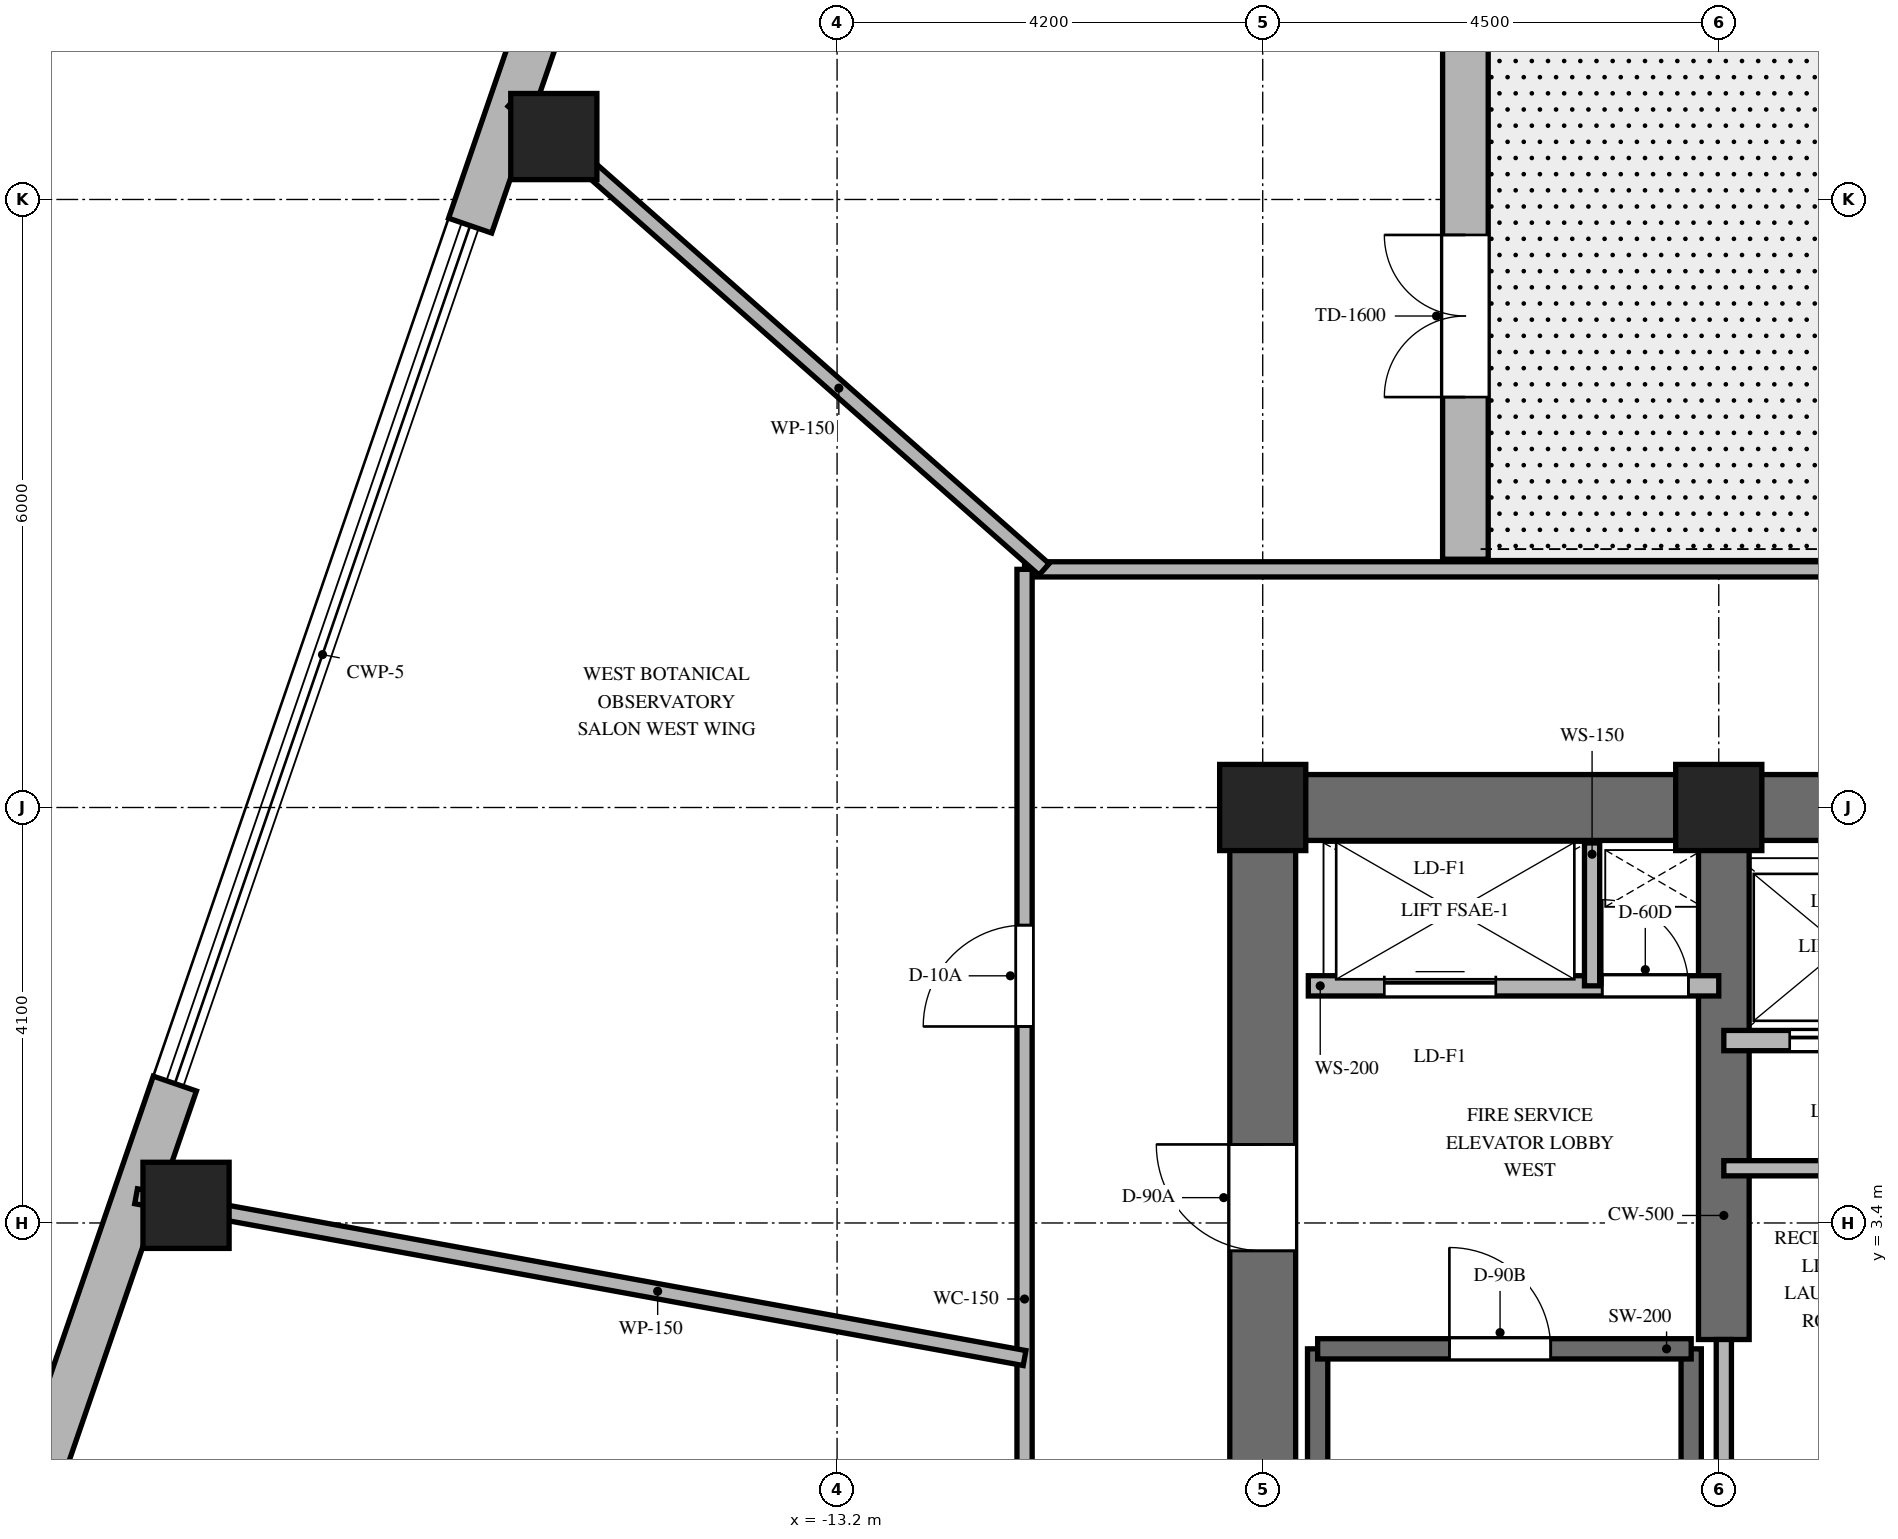
"""IFC4 building model, lengths in metres.
Left out: names, types, materials, properties, quantities, classifications, styles, units other than length and angle.
Written with IfcOpenShell. Run it as: python <this file> out.ifc"""

import sys

from ifc_helpers import new_model, si_unit, direction, frame, frame_2d, origin, origin_2d, place, context, subcontext, project, spatial, rectangle, extrude, element, fill, save


model = new_model("IFC4")
c1 = context("Model", 3, precision=1e-05, world=origin(), true_north=direction((0.0, 1.0)))
c2 = subcontext(c1, "Body", "Model", "MODEL_VIEW")
j1 = project(units=[si_unit("LENGTHUNIT", "METRE"), si_unit("PLANEANGLEUNIT", "RADIAN")], contexts=[c1])
p1 = place(None, origin())
s1 = spatial("IfcSite", under=j1, at=p1, CompositionType="ELEMENT")
p2 = place(p1, origin())
s2 = spatial("IfcBuilding", under=s1, at=p2, CompositionType="ELEMENT")
p3 = place(p2, frame((0.0, 0.0, 288.6)))
s3 = spatial("IfcBuildingStorey", under=s2, at=p3, CompositionType="ELEMENT", Elevation=288.6)
p4 = place(p3, frame((-9.325, 7.5, 0.0), z_axis=(0.0, 0.0, 1.0), x_axis=(1.0, 0.0, 0.0)))
e1 = element("IfcWall", 1, at=p4, inside=s3, PredefinedType="SHEAR", context=c2, shape_type="SweptSolid", body=[
    extrude(rectangle(XDim=9.375, YDim=0.65, at=frame_2d((4.688, 0.0))), origin(), (0.0, 0.0, 1.0), 4.5),
])
p5 = place(p3, frame((-9.0, -7.175, 0.0), z_axis=(0.0, 0.0, 1.0), x_axis=(0.0, 1.0, 0.0)))
e2 = element("IfcWall", 2, at=p5, inside=s3, PredefinedType="SHEAR", context=c2, shape_type="SweptSolid", body=[
    extrude(rectangle(XDim=14.35, YDim=0.65, at=frame_2d((7.175, 0.0))), origin(), (0.0, 0.0, 1.0), 4.5),
])
p6 = place(p5, frame((10.3, 0.0, 0.0)))
e3 = element("IfcOpeningElement", 3, at=p6, cuts=e2, PredefinedType="OPENING", context=c2, shape_type="SweptSolid", body=[
    extrude(rectangle(XDim=1.05, YDim=2.15, at=frame_2d((0.525, 1.075))), frame((0.0, 0.335, 0.0), z_axis=(0.0, -1.0, 0.0), x_axis=(1.0, 0.0, 0.0)), (0.0, 0.0, 1.0), 0.67),
])
p7 = place(p3, frame((-4.45, 2.25, 0.0), z_axis=(0.0, 0.0, 1.0), x_axis=(0.0, 1.0, 0.0)))
e4 = element("IfcWall", 4, at=p7, inside=s3, PredefinedType="SHEAR", context=c2, shape_type="SweptSolid", body=[
    extrude(rectangle(XDim=4.925, YDim=0.5, at=frame_2d((2.462, 0.0))), origin(), (0.0, 0.0, 1.0), 4.5),
])
for number, where, z_axis, x_axis in (
    (5, (-8.458, -6.985, 0.0), (0.0, 0.0, 1.0), (0.0, 1.0, 0.0)),
    (6, (-4.772, -6.985, 0.0), (0.0, 0.0, 1.0), (0.0, 1.0, 0.0)),
):
    element("IfcWall", number, at=place(p3, frame(where, z_axis=z_axis, x_axis=x_axis)), inside=s3, PredefinedType="SHEAR", context=c2, shape_type="SweptSolid", body=[
        extrude(rectangle(XDim=9.143, YDim=0.2, at=frame_2d((4.572, 0.0))), origin(), (0.0, 0.0, 1.0), 4.5),
    ])
p8 = place(p3, frame((-8.458, 2.158, 0.0), z_axis=(0.0, 0.0, 1.0), x_axis=(1.0, 0.0, 0.0)))
e7 = element("IfcWall", 7, at=p8, inside=s3, PredefinedType="SHEAR", context=c2, shape_type="SweptSolid", body=[
    extrude(rectangle(XDim=3.686, YDim=0.2, at=frame_2d((1.843, 0.0))), origin(), (0.0, 0.0, 1.0), 4.5),
])
p9 = place(p8, frame((1.3, 0.0, 0.0)))
e8 = element("IfcOpeningElement", 8, at=p9, cuts=e7, PredefinedType="OPENING", context=c2, shape_type="SweptSolid", body=[
    extrude(rectangle(XDim=1.0, YDim=2.15, at=frame_2d((0.5, 1.075))), frame((0.0, 0.11, 0.0), z_axis=(0.0, -1.0, 0.0), x_axis=(1.0, 0.0, 0.0)), (0.0, 0.0, 1.0), 0.22),
])
for number, where, z_axis, x_axis in (
    (9, (-4.5, 7.5, 0.0), (0.0, 0.0, 1.0), (1.0, 0.0, 0.0)),
    (10, (-9.0, 7.5, 0.0), (0.0, 0.0, 1.0), (1.0, 0.0, 0.0)),
    (11, (-15.995, 14.121, 0.0), (0.0, 0.0, 1.0), (1.0, 0.0, 0.0)),
    (12, (-19.624, 3.574, 0.0), (0.0, 0.0, 1.0), (1.0, 0.0, 0.0)),
):
    element("IfcColumn", number, at=place(p3, frame(where, z_axis=z_axis, x_axis=x_axis)), inside=s3, PredefinedType="COLUMN", context=c2, shape_type="SweptSolid", body=[
        extrude(rectangle(XDim=0.85, YDim=0.85, at=origin_2d()), origin(), (0.0, 0.0, 1.0), 4.5),
    ])
p10 = place(p3, frame((-7.0, 9.95, 0.0), z_axis=(0.0, 0.0, 1.0), x_axis=(0.0, 1.0, 0.0)))
e13 = element("IfcWall", 13, at=p10, inside=s3, PredefinedType="SOLIDWALL", context=c2, shape_type="SweptSolid", body=[
    extrude(rectangle(XDim=10.125, YDim=0.45, at=frame_2d((5.062, 0.0))), origin(), (0.0, 0.0, 1.0), 4.18),
])
p11 = place(p10, frame((1.6, 0.0, 0.0)))
e14 = element("IfcOpeningElement", 14, at=p11, cuts=e13, PredefinedType="OPENING", context=c2, shape_type="SweptSolid", body=[
    extrude(rectangle(XDim=1.6, YDim=2.25, at=frame_2d((0.8, 1.125))), frame((0.0, 0.235, 0.0), z_axis=(0.0, -1.0, 0.0), x_axis=(1.0, 0.0, 0.0)), (0.0, 0.0, 1.0), 0.47),
])
p12 = place(p3, frame((-15.26, 17.776, 0.0), z_axis=(0.0, 0.0, 1.0), x_axis=(-0.325408461582, -0.945573547182, 0.0)))
e15 = element("IfcWall", 15, at=p12, inside=s3, PredefinedType="SOLIDWALL", context=c2, shape_type="SweptSolid", body=[
    extrude(rectangle(XDim=4.795, YDim=0.45, at=frame_2d((2.397, 0.0))), origin(), (0.0, 0.0, 1.0), 4.18),
])
p13 = place(p3, frame((-19.734, 4.775, 0.0), z_axis=(0.0, 0.0, 1.0), x_axis=(-0.325437701015, -0.945563484256, 0.0)))
e16 = element("IfcWall", 16, at=p13, inside=s3, PredefinedType="SOLIDWALL", context=c2, shape_type="SweptSolid", body=[
    extrude(rectangle(XDim=4.803, YDim=0.45, at=frame_2d((2.402, 0.0))), origin(), (0.0, 0.0, 1.0), 4.18),
])
p14 = place(p3, frame((-8.55, 5.74, 0.0), z_axis=(0.0, 0.0, 1.0), x_axis=(1.0, 0.0, 0.0)))
e17 = element("IfcWall", 17, at=p14, inside=s3, PredefinedType="PARTITIONING", context=c2, shape_type="SweptSolid", body=[
    extrude(rectangle(XDim=4.05, YDim=0.2, at=frame_2d((2.025, 0.0))), origin(), (0.0, 0.0, 1.0), 4.18),
])
p15 = place(p14, frame((0.75, 0.0, 0.0)))
e18 = element("IfcOpeningElement", 18, at=p15, cuts=e17, PredefinedType="OPENING", context=c2, shape_type="SweptSolid", body=[
    extrude(rectangle(XDim=1.1, YDim=2.2, at=frame_2d((0.55, 1.1))), frame((0.0, 0.11, 0.0), z_axis=(0.0, -1.0, 0.0), x_axis=(1.0, 0.0, 0.0)), (0.0, 0.0, 1.0), 0.22),
])
p16 = place(p14, frame((2.9, 0.0, 0.0)))
e19 = element("IfcOpeningElement", 19, at=p16, cuts=e17, PredefinedType="OPENING", context=c2, shape_type="SweptSolid", body=[
    extrude(rectangle(XDim=0.85, YDim=2.03, at=frame_2d((0.425, 1.015))), frame((0.0, 0.11, 0.0), z_axis=(0.0, -1.0, 0.0), x_axis=(1.0, 0.0, 0.0)), (0.0, 0.0, 1.0), 0.22),
])
p17 = place(p3, frame((-5.75, 5.74, 0.0), z_axis=(0.0, 0.0, 1.0), x_axis=(0.0, 1.0, 0.0)))
e20 = element("IfcWall", 20, at=p17, inside=s3, PredefinedType="PARTITIONING", context=c2, shape_type="SweptSolid", body=[
    extrude(rectangle(XDim=1.41, YDim=0.15, at=frame_2d((0.705, 0.0))), origin(), (0.0, 0.0, 1.0), 4.18),
])
p18 = place(p3, frame((-4.45, 5.2, 0.0), z_axis=(0.0, 0.0, 1.0), x_axis=(1.0, 0.0, 0.0)))
e21 = element("IfcWall", 21, at=p18, inside=s3, PredefinedType="PARTITIONING", context=c2, shape_type="SweptSolid", body=[
    extrude(rectangle(XDim=4.5, YDim=0.2, at=frame_2d((2.25, 0.0))), origin(), (0.0, 0.0, 1.0), 4.18),
])
p19 = place(p18, frame((0.65, 0.0, 0.0)))
e22 = element("IfcOpeningElement", 22, at=p19, cuts=e21, PredefinedType="OPENING", context=c2, shape_type="SweptSolid", body=[
    extrude(rectangle(XDim=1.0, YDim=2.2, at=frame_2d((0.5, 1.1))), frame((0.0, 0.11, 0.0), z_axis=(0.0, -1.0, 0.0), x_axis=(1.0, 0.0, 0.0)), (0.0, 0.0, 1.0), 0.22),
])
p20 = place(p18, frame((2.85, 0.0, 0.0)))
e23 = element("IfcOpeningElement", 23, at=p20, cuts=e21, PredefinedType="OPENING", context=c2, shape_type="SweptSolid", body=[
    extrude(rectangle(XDim=1.0, YDim=2.2, at=frame_2d((0.5, 1.1))), frame((0.0, 0.11, 0.0), z_axis=(0.0, -1.0, 0.0), x_axis=(1.0, 0.0, 0.0)), (0.0, 0.0, 1.0), 0.22),
])
p21 = place(p3, frame((-4.45, -0.5, 0.0), z_axis=(0.0, 0.0, 1.0), x_axis=(0.0, 1.0, 0.0)))
e24 = element("IfcWall", 24, at=p21, inside=s3, PredefinedType="PARTITIONING", context=c2, shape_type="SweptSolid", body=[
    extrude(rectangle(XDim=2.75, YDim=0.15, at=frame_2d((1.375, 0.0))), origin(), (0.0, 0.0, 1.0), 4.18),
])
p22 = place(p3, frame((-4.45, 3.94, 0.0), z_axis=(0.0, 0.0, 1.0), x_axis=(1.0, 0.0, 0.0)))
e25 = element("IfcWall", 25, at=p22, inside=s3, PredefinedType="PARTITIONING", context=c2, shape_type="SweptSolid", body=[
    extrude(rectangle(XDim=2.55, YDim=0.15, at=frame_2d((1.275, 0.0))), origin(), (0.0, 0.0, 1.0), 4.18),
])
p23 = place(p3, frame((-11.35, 9.85, 0.0), z_axis=(0.0, 0.0, 1.0), x_axis=(1.0, 0.0, 0.0)))
e26 = element("IfcWall", 26, at=p23, inside=s3, PredefinedType="PARTITIONING", context=c2, shape_type="SweptSolid", body=[
    extrude(rectangle(XDim=22.7, YDim=0.15, at=frame_2d((11.35, 0.0))), origin(), (0.0, 0.0, 1.0), 3.67),
])
p24 = place(p23, frame((18.896, 0.0, 0.0)))
e27 = element("IfcOpeningElement", 27, at=p24, cuts=e26, PredefinedType="OPENING", context=c2, shape_type="SweptSolid", body=[
    extrude(rectangle(XDim=1.0, YDim=2.03, at=frame_2d((0.5, 1.015))), frame((0.0, 0.085, 0.0), z_axis=(0.0, -1.0, 0.0), x_axis=(1.0, 0.0, 0.0)), (0.0, 0.0, 1.0), 0.17),
])
p25 = place(p3, frame((-11.35, -9.85, 0.0), z_axis=(0.0, 0.0, 1.0), x_axis=(0.0, 1.0, 0.0)))
e28 = element("IfcWall", 28, at=p25, inside=s3, PredefinedType="PARTITIONING", context=c2, shape_type="SweptSolid", body=[
    extrude(rectangle(XDim=19.7, YDim=0.15, at=frame_2d((9.85, 0.0))), origin(), (0.0, 0.0, 1.0), 3.67),
])
p26 = place(p25, frame((15.189, 0.0, 0.0)))
e29 = element("IfcOpeningElement", 29, at=p26, cuts=e28, PredefinedType="OPENING", context=c2, shape_type="SweptSolid", body=[
    extrude(rectangle(XDim=1.0, YDim=2.03, at=frame_2d((0.5, 1.015))), frame((0.0, 0.085, 0.0), z_axis=(0.0, -1.0, 0.0), x_axis=(1.0, 0.0, 0.0)), (0.0, 0.0, 1.0), 0.17),
])
p27 = place(p25, frame((8.81, 0.0, 0.0)))
e30 = element("IfcOpeningElement", 30, at=p27, cuts=e28, PredefinedType="OPENING", context=c2, shape_type="SweptSolid", body=[
    extrude(rectangle(XDim=1.0, YDim=2.03, at=frame_2d((0.5, 1.015))), frame((0.0, 0.085, 0.0), z_axis=(0.0, -1.0, 0.0), x_axis=(1.0, 0.0, 0.0)), (0.0, 0.0, 1.0), 0.17),
])
p28 = place(p25, frame((2.973, 0.0, 0.0)))
e31 = element("IfcOpeningElement", 31, at=p28, cuts=e28, PredefinedType="OPENING", context=c2, shape_type="SweptSolid", body=[
    extrude(rectangle(XDim=1.0, YDim=2.03, at=frame_2d((0.5, 1.015))), frame((0.0, 0.085, 0.0), z_axis=(0.0, -1.0, 0.0), x_axis=(1.0, 0.0, 0.0)), (0.0, 0.0, 1.0), 0.17),
])
p29 = place(p3, frame((-11.157, 9.85, 0.0), z_axis=(0.0, 0.0, 1.0), x_axis=(-0.74966962095, 0.661812253909, 0.0)))
e32 = element("IfcWall", 32, at=p29, inside=s3, PredefinedType="PARTITIONING", context=c2, shape_type="SweptSolid", body=[
    extrude(rectangle(XDim=6.989, YDim=0.15, at=frame_2d((3.494, 0.0))), origin(), (0.0, 0.0, 1.0), 3.52),
])
p30 = place(p3, frame((-11.35, 2.067, 0.0), z_axis=(0.0, 0.0, 1.0), x_axis=(-0.983816386236, 0.179179569634, 0.0)))
e33 = element("IfcWall", 33, at=p30, inside=s3, PredefinedType="PARTITIONING", context=c2, shape_type="SweptSolid", body=[
    extrude(rectangle(XDim=8.911, YDim=0.15, at=frame_2d((4.456, 0.0))), origin(), (0.0, 0.0, 1.0), 3.52),
])
p31 = place(p11, origin())
e34 = element("IfcDoor", 34, at=p31, inside=s3, OperationType="DOUBLE_SWING_LEFT", PredefinedType="DOOR", context=c2, shape_type="SweptSolid", body=[
    extrude(rectangle(XDim=1.6, YDim=2.25, at=frame_2d((0.8, 1.125))), frame((0.0, 0.025, 0.0), z_axis=(0.0, -1.0, 0.0), x_axis=(1.0, 0.0, 0.0)), (0.0, 0.0, 1.0), 0.05),
])
fill(e14, e34)
p32 = place(p9, origin())
e35 = element("IfcDoor", 35, at=p32, inside=s3, OperationType="SINGLE_SWING_LEFT", PredefinedType="DOOR", context=c2, shape_type="SweptSolid", body=[
    extrude(rectangle(XDim=1.0, YDim=2.15, at=frame_2d((0.5, 1.075))), frame((0.0, 0.025, 0.0), z_axis=(0.0, -1.0, 0.0), x_axis=(1.0, 0.0, 0.0)), (0.0, 0.0, 1.0), 0.05),
])
fill(e8, e35)
p33 = place(p6, origin())
e36 = element("IfcDoor", 36, at=p33, inside=s3, OperationType="SINGLE_SWING_RIGHT", PredefinedType="DOOR", context=c2, shape_type="SweptSolid", body=[
    extrude(rectangle(XDim=1.05, YDim=2.15, at=frame_2d((0.525, 1.075))), frame((0.0, 0.025, 0.0), z_axis=(0.0, -1.0, 0.0), x_axis=(1.0, 0.0, 0.0)), (0.0, 0.0, 1.0), 0.05),
])
fill(e3, e36)
p34 = place(p15, origin())
e37 = element("IfcDoor", 37, at=p34, inside=s3, OperationType="SLIDING_TO_LEFT", PredefinedType="DOOR", context=c2, shape_type="SweptSolid", body=[
    extrude(rectangle(XDim=1.1, YDim=2.2, at=frame_2d((0.55, 1.1))), frame((0.0, 0.025, 0.0), z_axis=(0.0, -1.0, 0.0), x_axis=(1.0, 0.0, 0.0)), (0.0, 0.0, 1.0), 0.05),
])
fill(e18, e37)
p35 = place(p16, origin())
e38 = element("IfcDoor", 38, at=p35, inside=s3, OperationType="SINGLE_SWING_LEFT", PredefinedType="DOOR", context=c2, shape_type="SweptSolid", body=[
    extrude(rectangle(XDim=0.85, YDim=2.03, at=frame_2d((0.425, 1.015))), frame((0.0, 0.025, 0.0), z_axis=(0.0, -1.0, 0.0), x_axis=(1.0, 0.0, 0.0)), (0.0, 0.0, 1.0), 0.05),
])
fill(e19, e38)
p36 = place(p19, origin())
e39 = element("IfcDoor", 39, at=p36, inside=s3, OperationType="SLIDING_TO_LEFT", PredefinedType="DOOR", context=c2, shape_type="SweptSolid", body=[
    extrude(rectangle(XDim=1.0, YDim=2.2, at=frame_2d((0.5, 1.1))), frame((0.0, 0.025, 0.0), z_axis=(0.0, -1.0, 0.0), x_axis=(1.0, 0.0, 0.0)), (0.0, 0.0, 1.0), 0.05),
])
fill(e22, e39)
p37 = place(p26, origin())
e40 = element("IfcDoor", 40, at=p37, inside=s3, OperationType="SINGLE_SWING_LEFT", PredefinedType="DOOR", context=c2, shape_type="SweptSolid", body=[
    extrude(rectangle(XDim=1.0, YDim=2.03, at=frame_2d((0.5, 1.015))), frame((0.0, 0.025, 0.0), z_axis=(0.0, -1.0, 0.0), x_axis=(1.0, 0.0, 0.0)), (0.0, 0.0, 1.0), 0.05),
])
fill(e29, e40)
save(model, sys.argv[1])
